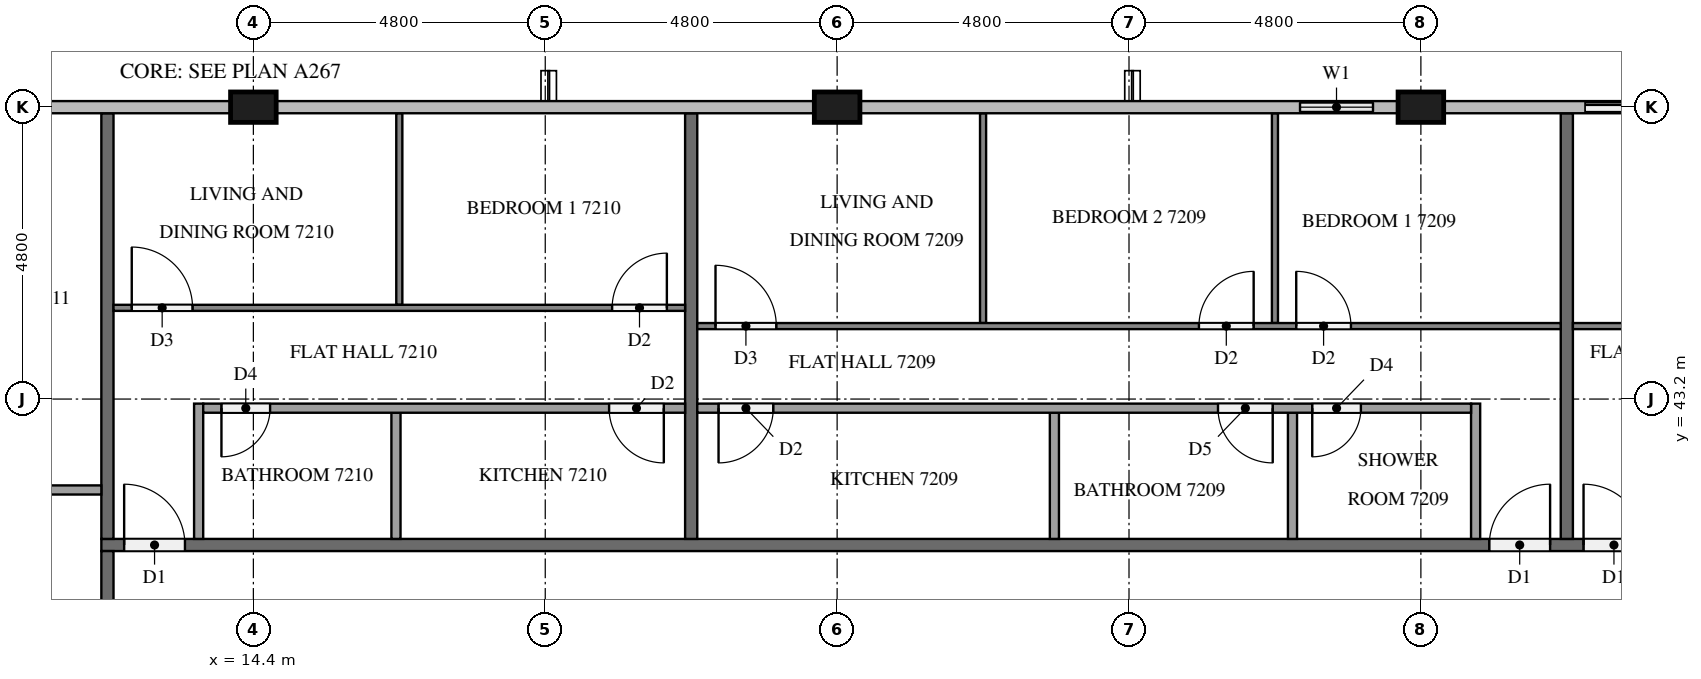
"""IFC4 building model, lengths in metres.
Left out: names, types, materials, properties, quantities, classifications, styles, units other than length and angle.
Written with IfcOpenShell. Run it as: python <this file> out.ifc"""

import sys

from ifc_helpers import new_model, si_unit, direction, frame, frame_2d, origin, origin_2d, place, context, subcontext, project, spatial, rectangle, extrude, element, fill, save


model = new_model("IFC4")
c1 = context("Model", 3, precision=1e-05, world=origin(), true_north=direction((0.0, 1.0)))
c2 = subcontext(c1, "Body", "Model", "MODEL_VIEW")
j1 = project(units=[si_unit("LENGTHUNIT", "METRE"), si_unit("PLANEANGLEUNIT", "RADIAN")], contexts=[c1])
p1 = place(None, origin())
s1 = spatial("IfcSite", under=j1, at=p1, CompositionType="ELEMENT")
p2 = place(p1, origin())
s2 = spatial("IfcBuilding", under=s1, at=p2, CompositionType="ELEMENT")
p3 = place(p2, frame((0.0, 0.0, 275.6)))
s3 = spatial("IfcBuildingStorey", under=s2, at=p3, CompositionType="ELEMENT", Elevation=275.6)
for number, where, z_axis, x_axis in (
    (1, (33.6, 48.0, 0.0), (0.0, 0.0, 1.0), (1.0, 0.0, 0.0)),
    (2, (24.0, 48.0, 0.0), (0.0, 0.0, 1.0), (1.0, 0.0, 0.0)),
    (3, (14.4, 48.0, 0.0), (0.0, 0.0, 1.0), (1.0, 0.0, 0.0)),
):
    element("IfcColumn", number, at=place(p3, frame(where, z_axis=z_axis, x_axis=x_axis)), inside=s3, PredefinedType="COLUMN", context=c2, shape_type="SweptSolid", body=[
        extrude(rectangle(XDim=0.75, YDim=0.5, at=origin_2d()), origin(), (0.0, 0.0, 1.0), 3.2),
    ])
p4 = place(p3, frame((38.4, 48.0, 0.0), z_axis=(0.0, 0.0, 1.0), x_axis=(-1.0, 0.0, 0.0)))
e4 = element("IfcWall", 4, at=p4, inside=s3, PredefinedType="SOLIDWALL", context=c2, shape_type="SweptSolid", body=[
    extrude(rectangle(XDim=2.4, YDim=0.15, at=frame_2d((1.2, 0.0))), origin(), (0.0, 0.0, 1.0), 3.2),
])
p5 = place(p4, frame((0.3, 0.0, 0.0)))
e5 = element("IfcOpeningElement", 5, at=p5, cuts=e4, PredefinedType="OPENING", context=c2, shape_type="SweptSolid", body=[
    extrude(rectangle(XDim=1.8, YDim=2.4, at=frame_2d((0.9, 1.2))), frame((0.0, 0.085, 0.0), z_axis=(0.0, -1.0, 0.0), x_axis=(1.0, 0.0, 0.0)), (0.0, 0.0, 1.0), 0.17),
])
p6 = place(p3, frame((33.225, 48.0, 0.0), z_axis=(0.0, 0.0, 1.0), x_axis=(-1.0, 0.0, 0.0)))
e6 = element("IfcWall", 6, at=p6, inside=s3, PredefinedType="SOLIDWALL", context=c2, shape_type="SweptSolid", body=[
    extrude(rectangle(XDim=2.025, YDim=0.15, at=frame_2d((1.013, 0.0))), origin(), (0.0, 0.0, 1.0), 3.2),
])
p7 = place(p6, frame((0.413, 0.0, 0.9)))
e7 = element("IfcOpeningElement", 7, at=p7, cuts=e6, PredefinedType="OPENING", context=c2, shape_type="SweptSolid", body=[
    extrude(rectangle(XDim=1.2, YDim=1.4, at=frame_2d((0.6, 0.7))), frame((0.0, 0.085, 0.0), z_axis=(0.0, -1.0, 0.0), x_axis=(1.0, 0.0, 0.0)), (0.0, 0.0, 1.0), 0.17),
])
p8 = place(p3, frame((11.9, 40.8, 0.0), z_axis=(0.0, 0.0, 1.0), x_axis=(1.0, 0.0, 0.0)))
e8 = element("IfcWall", 8, at=p8, inside=s3, PredefinedType="PARTITIONING", context=c2, shape_type="SweptSolid", body=[
    extrude(rectangle(XDim=38.6, YDim=0.2, at=frame_2d((19.3, 0.0))), origin(), (0.0, 0.0, 1.0), 3.2),
])
p9 = place(p8, frame((31.575, 0.0, 0.0)))
e9 = element("IfcOpeningElement", 9, at=p9, cuts=e8, PredefinedType="OPENING", context=c2, shape_type="SweptSolid", body=[
    extrude(rectangle(XDim=1.0, YDim=2.1, at=frame_2d((0.5, 1.05))), frame((0.0, 0.11, 0.0), z_axis=(0.0, -1.0, 0.0), x_axis=(1.0, 0.0, 0.0)), (0.0, 0.0, 1.0), 0.22),
])
p10 = place(p8, frame((24.375, 0.0, 0.0)))
e10 = element("IfcOpeningElement", 10, at=p10, cuts=e8, PredefinedType="OPENING", context=c2, shape_type="SweptSolid", body=[
    extrude(rectangle(XDim=1.0, YDim=2.1, at=frame_2d((0.5, 1.05))), frame((0.0, 0.11, 0.0), z_axis=(0.0, -1.0, 0.0), x_axis=(1.0, 0.0, 0.0)), (0.0, 0.0, 1.0), 0.22),
])
p11 = place(p8, frame((22.825, 0.0, 0.0)))
e11 = element("IfcOpeningElement", 11, at=p11, cuts=e8, PredefinedType="OPENING", context=c2, shape_type="SweptSolid", body=[
    extrude(rectangle(XDim=1.0, YDim=2.1, at=frame_2d((0.5, 1.05))), frame((0.0, 0.11, 0.0), z_axis=(0.0, -1.0, 0.0), x_axis=(1.0, 0.0, 0.0)), (0.0, 0.0, 1.0), 0.22),
])
p12 = place(p8, frame((0.375, 0.0, 0.0)))
e12 = element("IfcOpeningElement", 12, at=p12, cuts=e8, PredefinedType="OPENING", context=c2, shape_type="SweptSolid", body=[
    extrude(rectangle(XDim=1.0, YDim=2.1, at=frame_2d((0.5, 1.05))), frame((0.0, 0.11, 0.0), z_axis=(0.0, -1.0, 0.0), x_axis=(1.0, 0.0, 0.0)), (0.0, 0.0, 1.0), 0.22),
])
p13 = place(p3, frame((12.0, 12.1, 0.0), z_axis=(0.0, 0.0, 1.0), x_axis=(0.0, 1.0, 0.0)))
e13 = element("IfcWall", 13, at=p13, inside=s3, PredefinedType="PARTITIONING", context=c2, shape_type="SweptSolid", body=[
    extrude(rectangle(XDim=28.6, YDim=0.2, at=frame_2d((14.3, 0.0))), origin(), (0.0, 0.0, 1.0), 3.2),
])
p14 = place(p13, frame((24.175, 0.0, 0.0)))
e14 = element("IfcOpeningElement", 14, at=p14, cuts=e13, PredefinedType="OPENING", context=c2, shape_type="SweptSolid", body=[
    extrude(rectangle(XDim=1.0, YDim=2.1, at=frame_2d((0.5, 1.05))), frame((0.0, 0.11, 0.0), z_axis=(0.0, -1.0, 0.0), x_axis=(1.0, 0.0, 0.0)), (0.0, 0.0, 1.0), 0.22),
])
p15 = place(p13, frame((14.575, 0.0, 0.0)))
e15 = element("IfcOpeningElement", 15, at=p15, cuts=e13, PredefinedType="OPENING", context=c2, shape_type="SweptSolid", body=[
    extrude(rectangle(XDim=1.0, YDim=2.1, at=frame_2d((0.5, 1.05))), frame((0.0, 0.11, 0.0), z_axis=(0.0, -1.0, 0.0), x_axis=(1.0, 0.0, 0.0)), (0.0, 0.0, 1.0), 0.22),
])
p16 = place(p13, frame((0.175, 0.0, 0.0)))
e16 = element("IfcOpeningElement", 16, at=p16, cuts=e13, PredefinedType="OPENING", context=c2, shape_type="SweptSolid", body=[
    extrude(rectangle(XDim=1.0, YDim=2.1, at=frame_2d((0.5, 1.05))), frame((0.0, 0.11, 0.0), z_axis=(0.0, -1.0, 0.0), x_axis=(1.0, 0.0, 0.0)), (0.0, 0.0, 1.0), 0.22),
])
for number, where, z_axis, x_axis in (
    (17, (36.0, 47.9, 0.0), (0.0, 0.0, 1.0), (0.0, -1.0, 0.0)),
    (18, (21.6, 47.9, 0.0), (0.0, 0.0, 1.0), (0.0, -1.0, 0.0)),
    (19, (12.0, 47.9, 0.0), (0.0, 0.0, 1.0), (0.0, -1.0, 0.0)),
):
    element("IfcWall", number, at=place(p3, frame(where, z_axis=z_axis, x_axis=x_axis)), inside=s3, PredefinedType="PARTITIONING", context=c2, shape_type="SweptSolid", body=[
        extrude(rectangle(XDim=7.0, YDim=0.2, at=frame_2d((3.5, 0.0))), origin(), (0.0, 0.0, 1.0), 3.2),
    ])
p17 = place(p3, frame((36.1, 44.4, 0.0), z_axis=(0.0, 0.0, 1.0), x_axis=(1.0, 0.0, 0.0)))
e20 = element("IfcWall", 20, at=p17, inside=s3, PredefinedType="PARTITIONING", context=c2, shape_type="SweptSolid", body=[
    extrude(rectangle(XDim=7.0, YDim=0.1, at=frame_2d((3.5, 0.0))), origin(), (0.0, 0.0, 1.0), 3.2),
])
p18 = place(p17, frame((5.7, 0.0, 0.0)))
e21 = element("IfcOpeningElement", 21, at=p18, cuts=e20, PredefinedType="OPENING", context=c2, shape_type="SweptSolid", body=[
    extrude(rectangle(XDim=1.0, YDim=2.1, at=frame_2d((0.5, 1.05))), frame((0.0, 0.06, 0.0), z_axis=(0.0, -1.0, 0.0), x_axis=(1.0, 0.0, 0.0)), (0.0, 0.0, 1.0), 0.12),
])
for number, where, z_axis, x_axis in (
    (22, (31.2, 44.45, 0.0), (0.0, 0.0, 1.0), (0.0, 1.0, 0.0)),
    (23, (26.4, 44.45, 0.0), (0.0, 0.0, 1.0), (0.0, 1.0, 0.0)),
):
    element("IfcWall", number, at=place(p3, frame(where, z_axis=z_axis, x_axis=x_axis)), inside=s3, PredefinedType="PARTITIONING", context=c2, shape_type="SweptSolid", body=[
        extrude(rectangle(XDim=3.45, YDim=0.1, at=frame_2d((1.725, 0.0))), origin(), (0.0, 0.0, 1.0), 3.2),
    ])
p19 = place(p3, frame((21.7, 44.4, 0.0), z_axis=(0.0, 0.0, 1.0), x_axis=(1.0, 0.0, 0.0)))
e24 = element("IfcWall", 24, at=p19, inside=s3, PredefinedType="PARTITIONING", context=c2, shape_type="SweptSolid", body=[
    extrude(rectangle(XDim=14.2, YDim=0.1, at=frame_2d((7.1, 0.0))), origin(), (0.0, 0.0, 1.0), 3.2),
])
p20 = place(p19, frame((9.85, 0.0, 0.0)))
e25 = element("IfcOpeningElement", 25, at=p20, cuts=e24, PredefinedType="OPENING", context=c2, shape_type="SweptSolid", body=[
    extrude(rectangle(XDim=0.9, YDim=2.1, at=frame_2d((0.45, 1.05))), frame((0.0, 0.06, 0.0), z_axis=(0.0, -1.0, 0.0), x_axis=(1.0, 0.0, 0.0)), (0.0, 0.0, 1.0), 0.12),
])
p21 = place(p19, frame((8.25, 0.0, 0.0)))
e26 = element("IfcOpeningElement", 26, at=p21, cuts=e24, PredefinedType="OPENING", context=c2, shape_type="SweptSolid", body=[
    extrude(rectangle(XDim=0.9, YDim=2.1, at=frame_2d((0.45, 1.05))), frame((0.0, 0.06, 0.0), z_axis=(0.0, -1.0, 0.0), x_axis=(1.0, 0.0, 0.0)), (0.0, 0.0, 1.0), 0.12),
])
p22 = place(p19, frame((0.3, 0.0, 0.0)))
e27 = element("IfcOpeningElement", 27, at=p22, cuts=e24, PredefinedType="OPENING", context=c2, shape_type="SweptSolid", body=[
    extrude(rectangle(XDim=1.0, YDim=2.1, at=frame_2d((0.5, 1.05))), frame((0.0, 0.06, 0.0), z_axis=(0.0, -1.0, 0.0), x_axis=(1.0, 0.0, 0.0)), (0.0, 0.0, 1.0), 0.12),
])
for number, where, z_axis, x_axis in (
    (28, (31.489, 40.9, 0.0), (0.0, 0.0, 1.0), (0.0, 1.0, 0.0)),
    (29, (27.573, 40.9, 0.0), (0.0, 0.0, 1.0), (0.0, 1.0, 0.0)),
):
    element("IfcWall", number, at=place(p3, frame(where, z_axis=z_axis, x_axis=x_axis)), inside=s3, PredefinedType="PARTITIONING", context=c2, shape_type="SweptSolid", body=[
        extrude(rectangle(XDim=2.075, YDim=0.15, at=frame_2d((1.038, 0.0))), origin(), (0.0, 0.0, 1.0), 3.2),
    ])
p23 = place(p3, frame((34.5, 40.9, 0.0), z_axis=(0.0, 0.0, 1.0), x_axis=(0.0, 1.0, 0.0)))
e30 = element("IfcWall", 30, at=p23, inside=s3, PredefinedType="PARTITIONING", context=c2, shape_type="SweptSolid", body=[
    extrude(rectangle(XDim=2.225, YDim=0.15, at=frame_2d((1.113, 0.0))), origin(), (0.0, 0.0, 1.0), 3.2),
])
p24 = place(p3, frame((34.425, 43.05, 0.0), z_axis=(0.0, 0.0, 1.0), x_axis=(-1.0, 0.0, 0.0)))
e31 = element("IfcWall", 31, at=p24, inside=s3, PredefinedType="PARTITIONING", context=c2, shape_type="SweptSolid", body=[
    extrude(rectangle(XDim=12.725, YDim=0.15, at=frame_2d((6.363, 0.0))), origin(), (0.0, 0.0, 1.0), 3.2),
])
p25 = place(p24, frame((1.812, 0.0, 0.0)))
e32 = element("IfcOpeningElement", 32, at=p25, cuts=e31, PredefinedType="OPENING", context=c2, shape_type="SweptSolid", body=[
    extrude(rectangle(XDim=0.8, YDim=2.1, at=frame_2d((0.4, 1.05))), frame((0.0, 0.085, 0.0), z_axis=(0.0, -1.0, 0.0), x_axis=(1.0, 0.0, 0.0)), (0.0, 0.0, 1.0), 0.17),
])
p26 = place(p24, frame((3.261, 0.0, 0.0)))
e33 = element("IfcOpeningElement", 33, at=p26, cuts=e31, PredefinedType="OPENING", context=c2, shape_type="SweptSolid", body=[
    extrude(rectangle(XDim=0.9, YDim=2.1, at=frame_2d((0.45, 1.05))), frame((0.0, 0.085, 0.0), z_axis=(0.0, -1.0, 0.0), x_axis=(1.0, 0.0, 0.0)), (0.0, 0.0, 1.0), 0.17),
])
p27 = place(p24, frame((11.475, 0.0, 0.0)))
e34 = element("IfcOpeningElement", 34, at=p27, cuts=e31, PredefinedType="OPENING", context=c2, shape_type="SweptSolid", body=[
    extrude(rectangle(XDim=0.9, YDim=2.1, at=frame_2d((0.45, 1.05))), frame((0.0, 0.085, 0.0), z_axis=(0.0, -1.0, 0.0), x_axis=(1.0, 0.0, 0.0)), (0.0, 0.0, 1.0), 0.17),
])
p28 = place(p3, frame((16.8, 44.75, 0.0), z_axis=(0.0, 0.0, 1.0), x_axis=(0.0, 1.0, 0.0)))
e35 = element("IfcWall", 35, at=p28, inside=s3, PredefinedType="PARTITIONING", context=c2, shape_type="SweptSolid", body=[
    extrude(rectangle(XDim=3.15, YDim=0.1, at=frame_2d((1.575, 0.0))), origin(), (0.0, 0.0, 1.0), 3.2),
])
p29 = place(p3, frame((12.1, 44.7, 0.0), z_axis=(0.0, 0.0, 1.0), x_axis=(1.0, 0.0, 0.0)))
e36 = element("IfcWall", 36, at=p29, inside=s3, PredefinedType="PARTITIONING", context=c2, shape_type="SweptSolid", body=[
    extrude(rectangle(XDim=9.4, YDim=0.1, at=frame_2d((4.7, 0.0))), origin(), (0.0, 0.0, 1.0), 3.2),
])
p30 = place(p29, frame((0.3, 0.0, 0.0)))
e37 = element("IfcOpeningElement", 37, at=p30, cuts=e36, PredefinedType="OPENING", context=c2, shape_type="SweptSolid", body=[
    extrude(rectangle(XDim=1.0, YDim=2.1, at=frame_2d((0.5, 1.05))), frame((0.0, 0.06, 0.0), z_axis=(0.0, -1.0, 0.0), x_axis=(1.0, 0.0, 0.0)), (0.0, 0.0, 1.0), 0.12),
])
p31 = place(p29, frame((8.2, 0.0, 0.0)))
e38 = element("IfcOpeningElement", 38, at=p31, cuts=e36, PredefinedType="OPENING", context=c2, shape_type="SweptSolid", body=[
    extrude(rectangle(XDim=0.9, YDim=2.1, at=frame_2d((0.45, 1.05))), frame((0.0, 0.06, 0.0), z_axis=(0.0, -1.0, 0.0), x_axis=(1.0, 0.0, 0.0)), (0.0, 0.0, 1.0), 0.12),
])
p32 = place(p3, frame((16.745, 40.9, 0.0), z_axis=(0.0, 0.0, 1.0), x_axis=(0.0, 1.0, 0.0)))
e39 = element("IfcWall", 39, at=p32, inside=s3, PredefinedType="PARTITIONING", context=c2, shape_type="SweptSolid", body=[
    extrude(rectangle(XDim=2.075, YDim=0.15, at=frame_2d((1.038, 0.0))), origin(), (0.0, 0.0, 1.0), 3.2),
])
p33 = place(p3, frame((13.5, 40.9, 0.0), z_axis=(0.0, 0.0, 1.0), x_axis=(0.0, 1.0, 0.0)))
e40 = element("IfcWall", 40, at=p33, inside=s3, PredefinedType="PARTITIONING", context=c2, shape_type="SweptSolid", body=[
    extrude(rectangle(XDim=2.225, YDim=0.15, at=frame_2d((1.113, 0.0))), origin(), (0.0, 0.0, 1.0), 3.2),
])
p34 = place(p3, frame((21.5, 43.05, 0.0), z_axis=(0.0, 0.0, 1.0), x_axis=(-1.0, 0.0, 0.0)))
e41 = element("IfcWall", 41, at=p34, inside=s3, PredefinedType="PARTITIONING", context=c2, shape_type="SweptSolid", body=[
    extrude(rectangle(XDim=7.925, YDim=0.15, at=frame_2d((3.962, 0.0))), origin(), (0.0, 0.0, 1.0), 3.2),
])
p35 = place(p34, frame((6.825, 0.0, 0.0)))
e42 = element("IfcOpeningElement", 42, at=p35, cuts=e41, PredefinedType="OPENING", context=c2, shape_type="SweptSolid", body=[
    extrude(rectangle(XDim=0.8, YDim=2.1, at=frame_2d((0.4, 1.05))), frame((0.0, 0.085, 0.0), z_axis=(0.0, -1.0, 0.0), x_axis=(1.0, 0.0, 0.0)), (0.0, 0.0, 1.0), 0.17),
])
p36 = place(p34, frame((0.35, 0.0, 0.0)))
e43 = element("IfcOpeningElement", 43, at=p36, cuts=e41, PredefinedType="OPENING", context=c2, shape_type="SweptSolid", body=[
    extrude(rectangle(XDim=0.9, YDim=2.1, at=frame_2d((0.45, 1.05))), frame((0.0, 0.085, 0.0), z_axis=(0.0, -1.0, 0.0), x_axis=(1.0, 0.0, 0.0)), (0.0, 0.0, 1.0), 0.17),
])
p37 = place(p3, frame((11.9, 41.705, 0.0), z_axis=(0.0, 0.0, 1.0), x_axis=(-1.0, 0.0, 0.0)))
e44 = element("IfcWall", 44, at=p37, inside=s3, PredefinedType="PARTITIONING", context=c2, shape_type="SweptSolid", body=[
    extrude(rectangle(XDim=3.125, YDim=0.15, at=frame_2d((1.562, 0.0))), origin(), (0.0, 0.0, 1.0), 3.2),
])
p38 = place(p5, origin())
e45 = element("IfcDoor", 45, at=p38, inside=s3, OperationType="SLIDING_TO_RIGHT", PredefinedType="DOOR", context=c2, shape_type="SweptSolid", body=[
    extrude(rectangle(XDim=1.8, YDim=2.4, at=frame_2d((0.9, 1.2))), frame((0.0, 0.025, 0.0), z_axis=(0.0, -1.0, 0.0), x_axis=(1.0, 0.0, 0.0)), (0.0, 0.0, 1.0), 0.05),
])
fill(e5, e45)
p39 = place(p7, origin())
e46 = element("IfcWindow", 46, at=p39, inside=s3, PartitioningType="SINGLE_PANEL", PredefinedType="WINDOW", context=c2, shape_type="SweptSolid", body=[
    extrude(rectangle(XDim=1.2, YDim=1.4, at=frame_2d((0.6, 0.7))), frame((0.0, 0.03, 0.0), z_axis=(0.0, -1.0, 0.0), x_axis=(1.0, 0.0, 0.0)), (0.0, 0.0, 1.0), 0.06),
])
fill(e7, e46)
p40 = place(p10, origin())
e47 = element("IfcDoor", 47, at=p40, inside=s3, OperationType="SINGLE_SWING_LEFT", PredefinedType="DOOR", context=c2, shape_type="SweptSolid", body=[
    extrude(rectangle(XDim=1.0, YDim=2.1, at=frame_2d((0.5, 1.05))), frame((0.0, 0.025, 0.0), z_axis=(0.0, -1.0, 0.0), x_axis=(1.0, 0.0, 0.0)), (0.0, 0.0, 1.0), 0.05),
])
fill(e10, e47)
p41 = place(p11, origin())
e48 = element("IfcDoor", 48, at=p41, inside=s3, OperationType="SINGLE_SWING_RIGHT", PredefinedType="DOOR", context=c2, shape_type="SweptSolid", body=[
    extrude(rectangle(XDim=1.0, YDim=2.1, at=frame_2d((0.5, 1.05))), frame((0.0, 0.025, 0.0), z_axis=(0.0, -1.0, 0.0), x_axis=(1.0, 0.0, 0.0)), (0.0, 0.0, 1.0), 0.05),
])
fill(e11, e48)
p42 = place(p12, origin())
e49 = element("IfcDoor", 49, at=p42, inside=s3, OperationType="SINGLE_SWING_LEFT", PredefinedType="DOOR", context=c2, shape_type="SweptSolid", body=[
    extrude(rectangle(XDim=1.0, YDim=2.1, at=frame_2d((0.5, 1.05))), frame((0.0, 0.025, 0.0), z_axis=(0.0, -1.0, 0.0), x_axis=(1.0, 0.0, 0.0)), (0.0, 0.0, 1.0), 0.05),
])
fill(e12, e49)
p43 = place(p20, origin())
e50 = element("IfcDoor", 50, at=p43, inside=s3, OperationType="SINGLE_SWING_LEFT", PredefinedType="DOOR", context=c2, shape_type="SweptSolid", body=[
    extrude(rectangle(XDim=0.9, YDim=2.1, at=frame_2d((0.45, 1.05))), frame((0.0, 0.025, 0.0), z_axis=(0.0, -1.0, 0.0), x_axis=(1.0, 0.0, 0.0)), (0.0, 0.0, 1.0), 0.05),
])
fill(e25, e50)
p44 = place(p21, origin())
e51 = element("IfcDoor", 51, at=p44, inside=s3, OperationType="SINGLE_SWING_RIGHT", PredefinedType="DOOR", context=c2, shape_type="SweptSolid", body=[
    extrude(rectangle(XDim=0.9, YDim=2.1, at=frame_2d((0.45, 1.05))), frame((0.0, 0.025, 0.0), z_axis=(0.0, -1.0, 0.0), x_axis=(1.0, 0.0, 0.0)), (0.0, 0.0, 1.0), 0.05),
])
fill(e26, e51)
p45 = place(p22, origin())
e52 = element("IfcDoor", 52, at=p45, inside=s3, OperationType="SINGLE_SWING_LEFT", PredefinedType="DOOR", context=c2, shape_type="SweptSolid", body=[
    extrude(rectangle(XDim=1.0, YDim=2.1, at=frame_2d((0.5, 1.05))), frame((0.0, 0.025, 0.0), z_axis=(0.0, -1.0, 0.0), x_axis=(1.0, 0.0, 0.0)), (0.0, 0.0, 1.0), 0.05),
])
fill(e27, e52)
p46 = place(p25, origin())
e53 = element("IfcDoor", 53, at=p46, inside=s3, OperationType="SINGLE_SWING_RIGHT", PredefinedType="DOOR", context=c2, shape_type="SweptSolid", body=[
    extrude(rectangle(XDim=0.8, YDim=2.1, at=frame_2d((0.4, 1.05))), frame((0.0, 0.025, 0.0), z_axis=(0.0, -1.0, 0.0), x_axis=(1.0, 0.0, 0.0)), (0.0, 0.0, 1.0), 0.05),
])
fill(e32, e53)
p47 = place(p26, origin())
e54 = element("IfcDoor", 54, at=p47, inside=s3, OperationType="SINGLE_SWING_LEFT", PredefinedType="DOOR", context=c2, shape_type="SweptSolid", body=[
    extrude(rectangle(XDim=0.9, YDim=2.1, at=frame_2d((0.45, 1.05))), frame((0.0, 0.025, 0.0), z_axis=(0.0, -1.0, 0.0), x_axis=(1.0, 0.0, 0.0)), (0.0, 0.0, 1.0), 0.05),
])
fill(e33, e54)
p48 = place(p27, origin())
e55 = element("IfcDoor", 55, at=p48, inside=s3, OperationType="SINGLE_SWING_RIGHT", PredefinedType="DOOR", context=c2, shape_type="SweptSolid", body=[
    extrude(rectangle(XDim=0.9, YDim=2.1, at=frame_2d((0.45, 1.05))), frame((0.0, 0.025, 0.0), z_axis=(0.0, -1.0, 0.0), x_axis=(1.0, 0.0, 0.0)), (0.0, 0.0, 1.0), 0.05),
])
fill(e34, e55)
p49 = place(p30, origin())
e56 = element("IfcDoor", 56, at=p49, inside=s3, OperationType="SINGLE_SWING_LEFT", PredefinedType="DOOR", context=c2, shape_type="SweptSolid", body=[
    extrude(rectangle(XDim=1.0, YDim=2.1, at=frame_2d((0.5, 1.05))), frame((0.0, 0.025, 0.0), z_axis=(0.0, -1.0, 0.0), x_axis=(1.0, 0.0, 0.0)), (0.0, 0.0, 1.0), 0.05),
])
fill(e37, e56)
p50 = place(p31, origin())
e57 = element("IfcDoor", 57, at=p50, inside=s3, OperationType="SINGLE_SWING_RIGHT", PredefinedType="DOOR", context=c2, shape_type="SweptSolid", body=[
    extrude(rectangle(XDim=0.9, YDim=2.1, at=frame_2d((0.45, 1.05))), frame((0.0, 0.025, 0.0), z_axis=(0.0, -1.0, 0.0), x_axis=(1.0, 0.0, 0.0)), (0.0, 0.0, 1.0), 0.05),
])
fill(e38, e57)
p51 = place(p35, origin())
e58 = element("IfcDoor", 58, at=p51, inside=s3, OperationType="SINGLE_SWING_RIGHT", PredefinedType="DOOR", context=c2, shape_type="SweptSolid", body=[
    extrude(rectangle(XDim=0.8, YDim=2.1, at=frame_2d((0.4, 1.05))), frame((0.0, 0.025, 0.0), z_axis=(0.0, -1.0, 0.0), x_axis=(1.0, 0.0, 0.0)), (0.0, 0.0, 1.0), 0.05),
])
fill(e42, e58)
p52 = place(p36, origin())
e59 = element("IfcDoor", 59, at=p52, inside=s3, OperationType="SINGLE_SWING_LEFT", PredefinedType="DOOR", context=c2, shape_type="SweptSolid", body=[
    extrude(rectangle(XDim=0.9, YDim=2.1, at=frame_2d((0.45, 1.05))), frame((0.0, 0.025, 0.0), z_axis=(0.0, -1.0, 0.0), x_axis=(1.0, 0.0, 0.0)), (0.0, 0.0, 1.0), 0.05),
])
fill(e43, e59)
save(model, sys.argv[1])
